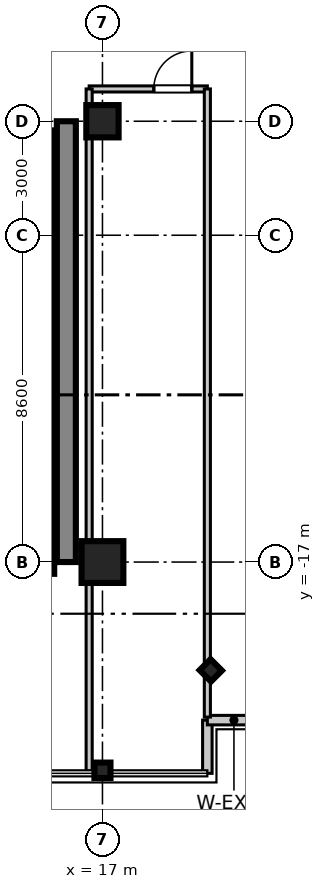
"""IFC4 building model, lengths in metres.
Left out: names, types, materials, properties, quantities, classifications, styles, units other than length and angle.
Written with IfcOpenShell. Run it as: python <this file> out.ifc"""

import sys

from ifc_helpers import new_model, si_unit, direction, frame, frame_2d, origin, origin_2d, place, context, subcontext, project, spatial, rectangle, i_section, extrude, source, transform, mapped, element, fill, save


model = new_model("IFC4")
c1 = context("Model", 3, precision=1e-05, world=origin(), true_north=direction((0.0, 1.0)))
c2 = subcontext(c1, "Body", "Model", "MODEL_VIEW")
j1 = project(units=[si_unit("LENGTHUNIT", "METRE"), si_unit("PLANEANGLEUNIT", "RADIAN")], contexts=[c1])
p1 = place(None, origin())
s1 = spatial("IfcSite", under=j1, at=p1, CompositionType="ELEMENT")
p2 = place(p1, origin())
s2 = spatial("IfcBuilding", under=s1, at=p2, CompositionType="ELEMENT")
p3 = place(p2, frame((0.0, 0.0, 163.6)))
s3 = spatial("IfcBuildingStorey", under=s2, at=p3, CompositionType="ELEMENT", Elevation=163.6)
m1 = source(origin(), c2, "Body", "SweptSolid", [
    extrude(rectangle(XDim=1.1, YDim=1.1, at=origin_2d()), origin(), (0.0, 0.0, 1.0), 3.605),
])
p4 = place(p3, frame((17.0, -17.0, 0.0), z_axis=(0.0, 0.0, 1.0), x_axis=(1.0, 0.0, 0.0)))
e1 = element("IfcColumn", 1, at=p4, inside=s3, PredefinedType="COLUMN", context=c2, shape_type="MappedRepresentation", body=[
    mapped(m1, transform((0.0, 0.0, 0.0), scale=1.0)),
])
m2 = source(origin(), c2, "Body", "SweptSolid", [
    extrude(rectangle(XDim=0.85, YDim=0.85, at=origin_2d()), origin(), (0.0, 0.0, 1.0), 3.605),
])
p5 = place(p3, frame((17.0, -5.4, 0.0), z_axis=(0.0, 0.0, 1.0), x_axis=(1.0, 0.0, 0.0)))
e2 = element("IfcColumn", 2, at=p5, inside=s3, PredefinedType="PILASTER", context=c2, shape_type="MappedRepresentation", body=[
    mapped(m2, transform((0.0, 0.0, 0.0), scale=1.0)),
])
m3 = source(origin(), c2, "Body", "SweptSolid", [
    extrude(i_section(OverallWidth=0.406, OverallDepth=0.422, WebThickness=0.019, FlangeThickness=0.03, at=origin_2d()), origin(), (0.0, 0.0, 1.0), 3.605),
])
for number, where, z_axis, x_axis in (
    (3, (17.0, -22.48, 0.0), (0.0, 0.0, 1.0), (0.0, 1.0, 0.0)),
    (4, (19.85, -19.85, 0.0), (0.0, 0.0, 1.0), (0.707, 0.707, 0.0)),
):
    element("IfcColumn", number, at=place(p3, frame(where, z_axis=z_axis, x_axis=x_axis)), inside=s3, PredefinedType="COLUMN", context=c2, shape_type="MappedRepresentation", body=[
        mapped(m3, transform((0.0, 0.0, 0.0), scale=1.0)),
    ])
m4 = source(origin(), c2, "Body", "SweptSolid", [
    extrude(rectangle(XDim=11.6, YDim=0.5, at=frame_2d((5.8, 0.0))), origin(), (0.0, 0.0, 1.0), 3.39),
])
p6 = place(p3, frame((16.05, -17.0, 0.0), z_axis=(0.0, 0.0, 1.0), x_axis=(0.0, 1.0, 0.0)))
e5 = element("IfcWall", 5, at=p6, inside=s3, PredefinedType="SHEAR", context=c2, shape_type="MappedRepresentation", body=[
    mapped(m4, transform((0.0, 0.0, 0.0), scale=1.0)),
])
m5 = source(origin(), c2, "Body", "SweptSolid", [
    extrude(rectangle(XDim=2.36, YDim=0.22, at=frame_2d((1.18, 0.0))), origin(), (0.0, 0.0, 1.0), 3.39),
])
p7 = place(p3, frame((15.62, -8.0, 0.0), z_axis=(0.0, 0.0, 1.0), x_axis=(0.0, 1.0, 0.0)))
e6 = element("IfcWall", 6, at=p7, inside=s3, PredefinedType="SHEAR", context=c2, shape_type="MappedRepresentation", body=[
    mapped(m5, transform((0.0, 0.0, 0.0), scale=1.0)),
])
m6 = source(origin(), c2, "Body", "SweptSolid", [
    extrude(rectangle(XDim=2.2, YDim=0.22, at=frame_2d((1.1, 0.0))), origin(), (0.0, 0.0, 1.0), 3.39),
])
for number, where, z_axis, x_axis in (
    (7, (15.62, -10.2, 0.0), (0.0, 0.0, 1.0), (0.0, 1.0, 0.0)),
    (8, (15.62, -12.4, 0.0), (0.0, 0.0, 1.0), (0.0, 1.0, 0.0)),
):
    element("IfcWall", number, at=place(p3, frame(where, z_axis=z_axis, x_axis=x_axis)), inside=s3, PredefinedType="SHEAR", context=c2, shape_type="MappedRepresentation", body=[
        mapped(m6, transform((0.0, 0.0, 0.0), scale=1.0)),
    ])
m7 = source(origin(), c2, "Body", "SweptSolid", [
    extrude(rectangle(XDim=2.3, YDim=0.22, at=frame_2d((1.15, 0.0))), origin(), (0.0, 0.0, 1.0), 3.39),
])
p8 = place(p3, frame((15.62, -14.7, 0.0), z_axis=(0.0, 0.0, 1.0), x_axis=(0.0, 1.0, 0.0)))
e9 = element("IfcWall", 9, at=p8, inside=s3, PredefinedType="SHEAR", context=c2, shape_type="MappedRepresentation", body=[
    mapped(m7, transform((0.0, 0.0, 0.0), scale=1.0)),
])
m8 = source(origin(), c2, "Body", "SweptSolid", [
    extrude(rectangle(XDim=2.61, YDim=0.22, at=frame_2d((1.305, 0.0))), origin(), (0.0, 0.0, 1.0), 3.39),
])
p9 = place(p3, frame((15.62, -17.31, 0.0), z_axis=(0.0, 0.0, 1.0), x_axis=(0.0, 1.0, 0.0)))
e10 = element("IfcWall", 10, at=p9, inside=s3, PredefinedType="SHEAR", context=c2, shape_type="MappedRepresentation", body=[
    mapped(m8, transform((0.0, 0.0, 0.0), scale=1.0)),
])
m9 = source(origin(), c2, "Body", "SweptSolid", [
    extrude(rectangle(XDim=1.4, YDim=0.25, at=frame_2d((0.7, 0.0))), origin(), (0.0, 0.0, 1.0), 3.39),
])
p10 = place(p3, frame((19.76, -22.56, 0.0), z_axis=(0.0, 0.0, 1.0), x_axis=(0.0, 1.0, 0.0)))
e11 = element("IfcWall", 11, at=p10, inside=s3, PredefinedType="STANDARD", context=c2, shape_type="MappedRepresentation", body=[
    mapped(m9, transform((0.0, 0.0, 0.0), scale=1.0)),
])
m10 = source(origin(), c2, "Body", "SweptSolid", [
    extrude(rectangle(XDim=1.4, YDim=0.25, at=frame_2d((0.7, 0.0))), origin(), (0.0, 0.0, 1.0), 3.39),
])
p11 = place(p3, frame((19.76, -21.16, 0.0), z_axis=(0.0, 0.0, 1.0), x_axis=(1.0, 0.0, 0.0)))
e12 = element("IfcWall", 12, at=p11, inside=s3, PredefinedType="STANDARD", context=c2, shape_type="MappedRepresentation", body=[
    mapped(m10, transform((0.0, 0.0, 0.0), scale=1.0)),
])
m11 = source(origin(), c2, "Body", "SweptSolid", [
    extrude(rectangle(XDim=3.11, YDim=0.16, at=frame_2d((1.555, 0.0))), origin(), (0.0, 0.0, 1.0), 2.73),
])
p12 = place(p3, frame((16.65, -4.55, 0.0), z_axis=(0.0, 0.0, 1.0), x_axis=(1.0, 0.0, 0.0)))
e13 = element("IfcWall", 13, at=p12, inside=s3, PredefinedType="PARTITIONING", context=c2, shape_type="MappedRepresentation", body=[
    mapped(m11, transform((0.0, 0.0, 0.0), scale=1.0)),
])
p13 = place(p12, frame((1.701, 0.0, 0.0)))
e14 = element("IfcOpeningElement", 14, at=p13, cuts=e13, PredefinedType="OPENING", context=c2, shape_type="SweptSolid", body=[
    extrude(rectangle(XDim=1.0, YDim=2.1, at=frame_2d((0.5, 1.05))), frame((0.0, 0.09, 0.0), z_axis=(0.0, -1.0, 0.0), x_axis=(1.0, 0.0, 0.0)), (0.0, 0.0, 1.0), 0.18),
])
m12 = source(origin(), c2, "Body", "SweptSolid", [
    extrude(rectangle(XDim=17.95, YDim=0.16, at=frame_2d((8.975, 0.0))), origin(), (0.0, 0.0, 1.0), 2.73),
])
p14 = place(p3, frame((16.65, -22.5, 0.0), z_axis=(0.0, 0.0, 1.0), x_axis=(0.0, 1.0, 0.0)))
e15 = element("IfcWall", 15, at=p14, inside=s3, PredefinedType="PARTITIONING", context=c2, shape_type="MappedRepresentation", body=[
    mapped(m12, transform((0.0, 0.0, 0.0), scale=1.0)),
])
m13 = source(origin(), c2, "Body", "SweptSolid", [
    extrude(rectangle(XDim=16.53, YDim=0.16, at=frame_2d((8.265, 0.0))), origin(), (0.0, 0.0, 1.0), 2.73),
])
p15 = place(p3, frame((19.76, -21.08, 0.0), z_axis=(0.0, 0.0, 1.0), x_axis=(0.0, 1.0, 0.0)))
e16 = element("IfcWall", 16, at=p15, inside=s3, PredefinedType="PARTITIONING", context=c2, shape_type="MappedRepresentation", body=[
    mapped(m13, transform((0.0, 0.0, 0.0), scale=1.0)),
])
m14 = source(origin(), c2, "Body", "SweptSolid", [
    extrude(rectangle(XDim=1.0, YDim=2.1, at=frame_2d((0.5, 1.05))), frame((0.0, 0.025, 0.0), z_axis=(0.0, -1.0, 0.0), x_axis=(1.0, 0.0, 0.0)), (0.0, 0.0, 1.0), 0.05),
])
p16 = place(p13, frame((1.0, 0.0, 0.0), z_axis=(0.0, 0.0, 1.0), x_axis=(-1.0, 0.0, 0.0)))
e17 = element("IfcDoor", 17, at=p16, inside=s3, OperationType="SINGLE_SWING_RIGHT", PredefinedType="DOOR", context=c2, shape_type="MappedRepresentation", body=[
    mapped(m14, transform((0.0, 0.0, 0.0), scale=1.0)),
])
fill(e14, e17)
save(model, sys.argv[1])
